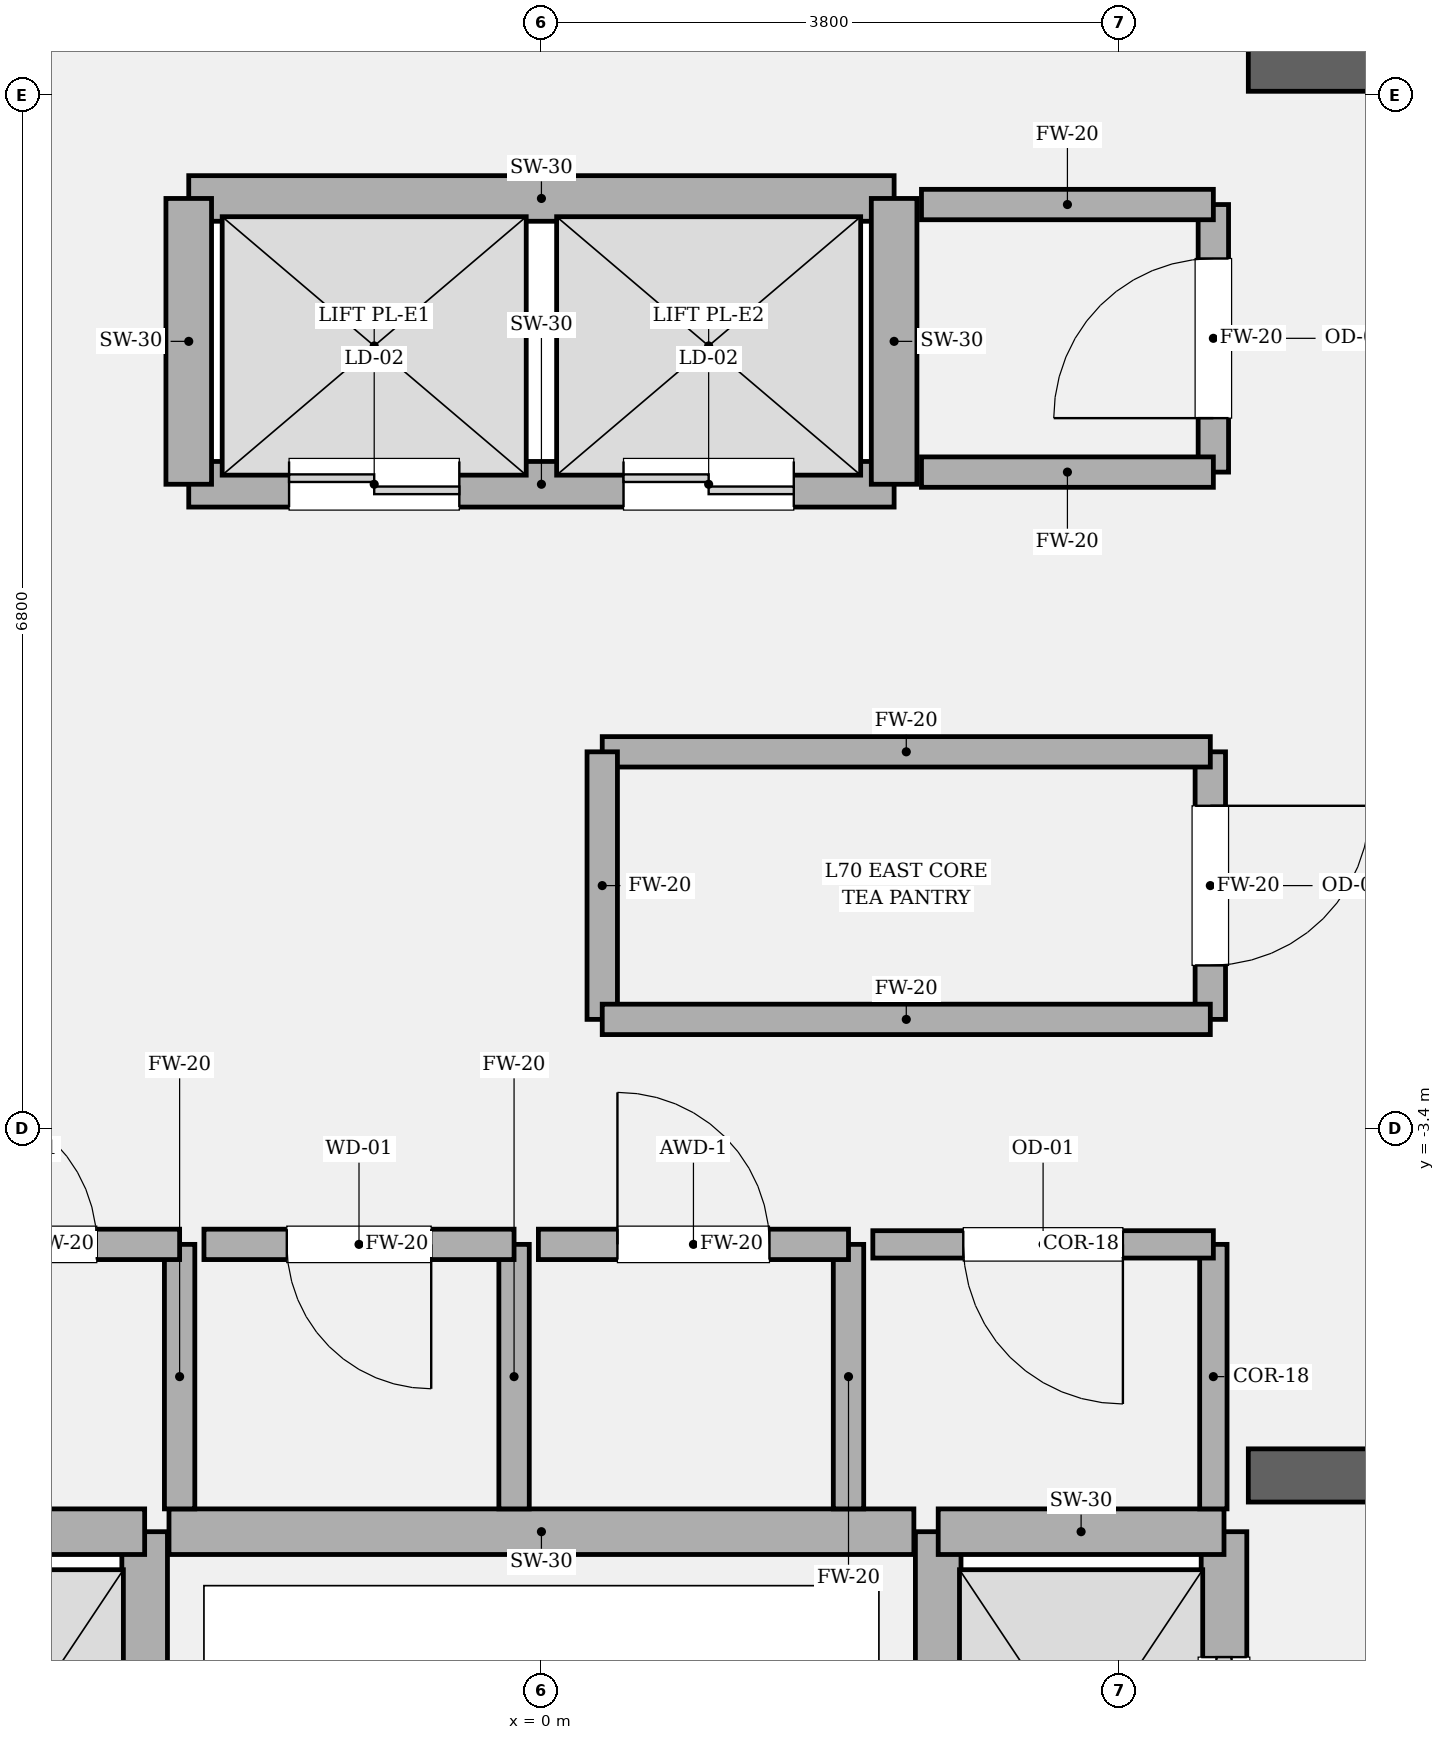
"""IFC4 building model, lengths in metres.
Left out: names, types, materials, properties, quantities, classifications, styles, units other than length and angle.
Written with IfcOpenShell. Run it as: python <this file> out.ifc"""

import sys

from ifc_helpers import new_model, si_unit, direction, frame, frame_2d, origin, place, context, subcontext, project, spatial, rectangle, extrude, element, fill, save


model = new_model("IFC4")
c1 = context("Model", 3, precision=1e-05, world=origin(), true_north=direction((0.0, 1.0)))
c2 = subcontext(c1, "Body", "Model", "MODEL_VIEW")
j1 = project(units=[si_unit("LENGTHUNIT", "METRE"), si_unit("PLANEANGLEUNIT", "RADIAN")], contexts=[c1])
p1 = place(None, origin())
s1 = spatial("IfcSite", under=j1, at=p1, CompositionType="ELEMENT")
p2 = place(p1, origin())
s2 = spatial("IfcBuilding", under=s1, at=p2, CompositionType="ELEMENT")
p3 = place(p2, frame((0.0, 0.0, 296.4)))
s3 = spatial("IfcBuildingStorey", under=s2, at=p3, CompositionType="ELEMENT", Elevation=296.4)
p4 = place(p3, frame((4.65, -5.68, 0.0), z_axis=(0.0, 0.0, 1.0), x_axis=(1.0, 0.0, 0.0)))
e1 = element("IfcWall", 1, at=p4, inside=s3, PredefinedType="SOLIDWALL", context=c2, shape_type="SweptSolid", body=[
    extrude(rectangle(XDim=5.275, YDim=0.35, at=frame_2d((2.638, 0.0))), origin(), (0.0, 0.0, 1.0), 4.2),
])
p5 = place(p4, frame((2.71, 0.0, 0.0)))
e2 = element("IfcOpeningElement", 2, at=p5, cuts=e1, PredefinedType="OPENING", context=c2, shape_type="SweptSolid", body=[
    extrude(rectangle(XDim=1.18, YDim=2.2, at=frame_2d((0.59, 1.1))), frame((0.0, 0.185, 0.0), z_axis=(0.0, -1.0, 0.0), x_axis=(1.0, 0.0, 0.0)), (0.0, 0.0, 1.0), 0.37),
])
p6 = place(p3, frame((4.65, 3.6, 0.0), z_axis=(0.0, 0.0, 1.0), x_axis=(1.0, 0.0, 0.0)))
e3 = element("IfcWall", 3, at=p6, inside=s3, PredefinedType="SOLIDWALL", context=c2, shape_type="SweptSolid", body=[
    extrude(rectangle(XDim=5.275, YDim=0.35, at=frame_2d((2.638, 0.0))), origin(), (0.0, 0.0, 1.0), 4.2),
])
p7 = place(p3, frame((-2.61, -8.82, 0.0), z_axis=(0.0, 0.0, 1.0), x_axis=(0.0, 1.0, 0.0)))
e4 = element("IfcWall", 4, at=p7, inside=s3, PredefinedType="SOLIDWALL", context=c2, shape_type="SweptSolid", body=[
    extrude(rectangle(XDim=2.77, YDim=0.3, at=frame_2d((1.385, 0.0))), origin(), (0.0, 0.0, 1.0), 4.0),
])
p8 = place(p3, frame((-4.49, -6.05, 0.0), z_axis=(0.0, 0.0, 1.0), x_axis=(1.0, 0.0, 0.0)))
e5 = element("IfcWall", 5, at=p8, inside=s3, PredefinedType="SOLIDWALL", context=c2, shape_type="SweptSolid", body=[
    extrude(rectangle(XDim=1.88, YDim=0.3, at=frame_2d((0.94, 0.0))), origin(), (0.0, 0.0, 1.0), 4.0),
])
p9 = place(p3, frame((4.49, -8.82, 0.0), z_axis=(0.0, 0.0, 1.0), x_axis=(0.0, 1.0, 0.0)))
e6 = element("IfcWall", 6, at=p9, inside=s3, PredefinedType="SOLIDWALL", context=c2, shape_type="SweptSolid", body=[
    extrude(rectangle(XDim=2.77, YDim=0.3, at=frame_2d((1.385, 0.0))), origin(), (0.0, 0.0, 1.0), 4.0),
])
p10 = place(p9, frame((0.825, 0.0, 0.0)))
e7 = element("IfcOpeningElement", 7, at=p10, cuts=e6, PredefinedType="OPENING", context=c2, shape_type="SweptSolid", body=[
    extrude(rectangle(XDim=1.12, YDim=2.25, at=frame_2d((0.56, 1.125))), frame((0.0, 0.16, 0.0), z_axis=(0.0, -1.0, 0.0), x_axis=(1.0, 0.0, 0.0)), (0.0, 0.0, 1.0), 0.32),
])
p11 = place(p3, frame((2.61, -8.82, 0.0), z_axis=(0.0, 0.0, 1.0), x_axis=(0.0, 1.0, 0.0)))
e8 = element("IfcWall", 8, at=p11, inside=s3, PredefinedType="SOLIDWALL", context=c2, shape_type="SweptSolid", body=[
    extrude(rectangle(XDim=2.77, YDim=0.3, at=frame_2d((1.385, 0.0))), origin(), (0.0, 0.0, 1.0), 4.0),
])
p12 = place(p3, frame((2.61, -6.05, 0.0), z_axis=(0.0, 0.0, 1.0), x_axis=(1.0, 0.0, 0.0)))
e9 = element("IfcWall", 9, at=p12, inside=s3, PredefinedType="SOLIDWALL", context=c2, shape_type="SweptSolid", body=[
    extrude(rectangle(XDim=1.88, YDim=0.3, at=frame_2d((0.94, 0.0))), origin(), (0.0, 0.0, 1.0), 4.0),
])
p13 = place(p3, frame((-2.32, 0.84, 0.0), z_axis=(0.0, 0.0, 1.0), x_axis=(1.0, 0.0, 0.0)))
e10 = element("IfcWall", 10, at=p13, inside=s3, PredefinedType="SOLIDWALL", context=c2, shape_type="SweptSolid", body=[
    extrude(rectangle(XDim=4.64, YDim=0.3, at=frame_2d((2.32, 0.0))), origin(), (0.0, 0.0, 1.0), 4.0),
])
p14 = place(p13, frame((0.66, 0.0, 0.0)))
e11 = element("IfcOpeningElement", 11, at=p14, cuts=e10, PredefinedType="OPENING", context=c2, shape_type="SweptSolid", body=[
    extrude(rectangle(XDim=1.12, YDim=2.25, at=frame_2d((0.56, 1.125))), frame((0.0, 0.16, 0.0), z_axis=(0.0, -1.0, 0.0), x_axis=(1.0, 0.0, 0.0)), (0.0, 0.0, 1.0), 0.32),
])
p15 = place(p13, frame((2.86, 0.0, 0.0)))
e12 = element("IfcOpeningElement", 12, at=p15, cuts=e10, PredefinedType="OPENING", context=c2, shape_type="SweptSolid", body=[
    extrude(rectangle(XDim=1.12, YDim=2.25, at=frame_2d((0.56, 1.125))), frame((0.0, 0.16, 0.0), z_axis=(0.0, -1.0, 0.0), x_axis=(1.0, 0.0, 0.0)), (0.0, 0.0, 1.0), 0.32),
])
p16 = place(p3, frame((-2.32, 2.72, 0.0), z_axis=(0.0, 0.0, 1.0), x_axis=(1.0, 0.0, 0.0)))
e13 = element("IfcWall", 13, at=p16, inside=s3, PredefinedType="SOLIDWALL", context=c2, shape_type="SweptSolid", body=[
    extrude(rectangle(XDim=4.64, YDim=0.3, at=frame_2d((2.32, 0.0))), origin(), (0.0, 0.0, 1.0), 4.0),
])
for number, where, z_axis, x_axis in (
    (14, (-2.32, 0.84, 0.0), (0.0, 0.0, 1.0), (0.0, 1.0, 0.0)),
    (15, (2.32, 0.84, 0.0), (0.0, 0.0, 1.0), (0.0, 1.0, 0.0)),
):
    element("IfcWall", number, at=place(p3, frame(where, z_axis=z_axis, x_axis=x_axis)), inside=s3, PredefinedType="SOLIDWALL", context=c2, shape_type="SweptSolid", body=[
        extrude(rectangle(XDim=1.88, YDim=0.3, at=frame_2d((0.94, 0.0))), origin(), (0.0, 0.0, 1.0), 4.0),
    ])
p17 = place(p3, frame((-2.45, -6.05, 0.0), z_axis=(0.0, 0.0, 1.0), x_axis=(1.0, 0.0, 0.0)))
e16 = element("IfcWall", 16, at=p17, inside=s3, PredefinedType="SOLIDWALL", context=c2, shape_type="SweptSolid", body=[
    extrude(rectangle(XDim=4.9, YDim=0.3, at=frame_2d((2.45, 0.0))), origin(), (0.0, 0.0, 1.0), 4.0),
])
p18 = place(p3, frame((-2.38, -5.9, 0.0), z_axis=(0.0, 0.0, 1.0), x_axis=(0.0, 1.0, 0.0)))
e17 = element("IfcWall", 17, at=p18, inside=s3, PredefinedType="SOLIDWALL", context=c2, shape_type="SweptSolid", body=[
    extrude(rectangle(XDim=1.74, YDim=0.2, at=frame_2d((0.87, 0.0))), origin(), (0.0, 0.0, 1.0), 4.0),
])
p19 = place(p3, frame((-2.38, -4.16, 0.0), z_axis=(0.0, 0.0, 1.0), x_axis=(-1.0, 0.0, 0.0)))
e18 = element("IfcWall", 18, at=p19, inside=s3, PredefinedType="SOLIDWALL", context=c2, shape_type="SweptSolid", body=[
    extrude(rectangle(XDim=2.04, YDim=0.2, at=frame_2d((1.02, 0.0))), origin(), (0.0, 0.0, 1.0), 4.0),
])
p20 = place(p19, frame((0.545, 0.0, 0.0)))
e19 = element("IfcOpeningElement", 19, at=p20, cuts=e18, PredefinedType="OPENING", context=c2, shape_type="SweptSolid", body=[
    extrude(rectangle(XDim=0.95, YDim=2.15, at=frame_2d((0.475, 1.075))), frame((0.0, 0.11, 0.0), z_axis=(0.0, -1.0, 0.0), x_axis=(1.0, 0.0, 0.0)), (0.0, 0.0, 1.0), 0.22),
])
p21 = place(p3, frame((-0.18, -5.9, 0.0), z_axis=(0.0, 0.0, 1.0), x_axis=(0.0, 1.0, 0.0)))
e20 = element("IfcWall", 20, at=p21, inside=s3, PredefinedType="SOLIDWALL", context=c2, shape_type="SweptSolid", body=[
    extrude(rectangle(XDim=1.74, YDim=0.2, at=frame_2d((0.87, 0.0))), origin(), (0.0, 0.0, 1.0), 4.0),
])
p22 = place(p3, frame((-0.18, -4.16, 0.0), z_axis=(0.0, 0.0, 1.0), x_axis=(-1.0, 0.0, 0.0)))
e21 = element("IfcWall", 21, at=p22, inside=s3, PredefinedType="SOLIDWALL", context=c2, shape_type="SweptSolid", body=[
    extrude(rectangle(XDim=2.04, YDim=0.2, at=frame_2d((1.02, 0.0))), origin(), (0.0, 0.0, 1.0), 4.0),
])
p23 = place(p22, frame((0.545, 0.0, 0.0)))
e22 = element("IfcOpeningElement", 22, at=p23, cuts=e21, PredefinedType="OPENING", context=c2, shape_type="SweptSolid", body=[
    extrude(rectangle(XDim=0.95, YDim=2.15, at=frame_2d((0.475, 1.075))), frame((0.0, 0.11, 0.0), z_axis=(0.0, -1.0, 0.0), x_axis=(1.0, 0.0, 0.0)), (0.0, 0.0, 1.0), 0.22),
])
p24 = place(p3, frame((2.02, -5.9, 0.0), z_axis=(0.0, 0.0, 1.0), x_axis=(0.0, 1.0, 0.0)))
e23 = element("IfcWall", 23, at=p24, inside=s3, PredefinedType="SOLIDWALL", context=c2, shape_type="SweptSolid", body=[
    extrude(rectangle(XDim=1.74, YDim=0.2, at=frame_2d((0.87, 0.0))), origin(), (0.0, 0.0, 1.0), 4.0),
])
p25 = place(p3, frame((2.02, -4.16, 0.0), z_axis=(0.0, 0.0, 1.0), x_axis=(-1.0, 0.0, 0.0)))
e24 = element("IfcWall", 24, at=p25, inside=s3, PredefinedType="SOLIDWALL", context=c2, shape_type="SweptSolid", body=[
    extrude(rectangle(XDim=2.04, YDim=0.2, at=frame_2d((1.02, 0.0))), origin(), (0.0, 0.0, 1.0), 4.0),
])
p26 = place(p25, frame((0.52, 0.0, 0.0)))
e25 = element("IfcOpeningElement", 25, at=p26, cuts=e24, PredefinedType="OPENING", context=c2, shape_type="SweptSolid", body=[
    extrude(rectangle(XDim=1.0, YDim=2.15, at=frame_2d((0.5, 1.075))), frame((0.0, 0.11, 0.0), z_axis=(0.0, -1.0, 0.0), x_axis=(1.0, 0.0, 0.0)), (0.0, 0.0, 1.0), 0.22),
])
p27 = place(p3, frame((4.42, -5.9, 0.0), z_axis=(0.0, 0.0, 1.0), x_axis=(0.0, 1.0, 0.0)))
e26 = element("IfcWall", 26, at=p27, inside=s3, PredefinedType="PARTITIONING", context=c2, shape_type="SweptSolid", body=[
    extrude(rectangle(XDim=1.74, YDim=0.18, at=frame_2d((0.87, 0.0))), origin(), (0.0, 0.0, 1.0), 4.0),
])
p28 = place(p3, frame((4.42, -4.16, 0.0), z_axis=(0.0, 0.0, 1.0), x_axis=(-1.0, 0.0, 0.0)))
e27 = element("IfcWall", 27, at=p28, inside=s3, PredefinedType="PARTITIONING", context=c2, shape_type="SweptSolid", body=[
    extrude(rectangle(XDim=2.24, YDim=0.18, at=frame_2d((1.12, 0.0))), origin(), (0.0, 0.0, 1.0), 4.0),
])
p29 = place(p28, frame((0.595, 0.0, 0.0)))
e28 = element("IfcOpeningElement", 28, at=p29, cuts=e27, PredefinedType="OPENING", context=c2, shape_type="SweptSolid", body=[
    extrude(rectangle(XDim=1.05, YDim=2.2, at=frame_2d((0.525, 1.1))), frame((0.0, 0.1, 0.0), z_axis=(0.0, -1.0, 0.0), x_axis=(1.0, 0.0, 0.0)), (0.0, 0.0, 1.0), 0.2),
])
p30 = place(p3, frame((4.4, -2.68, 0.0), z_axis=(0.0, 0.0, 1.0), x_axis=(0.0, 1.0, 0.0)))
e29 = element("IfcWall", 29, at=p30, inside=s3, PredefinedType="SOLIDWALL", context=c2, shape_type="SweptSolid", body=[
    extrude(rectangle(XDim=1.76, YDim=0.2, at=frame_2d((0.88, 0.0))), origin(), (0.0, 0.0, 1.0), 4.0),
])
p31 = place(p30, frame((0.355, 0.0, 0.0)))
e30 = element("IfcOpeningElement", 30, at=p31, cuts=e29, PredefinedType="OPENING", context=c2, shape_type="SweptSolid", body=[
    extrude(rectangle(XDim=1.05, YDim=2.2, at=frame_2d((0.525, 1.1))), frame((0.0, 0.11, 0.0), z_axis=(0.0, -1.0, 0.0), x_axis=(1.0, 0.0, 0.0)), (0.0, 0.0, 1.0), 0.22),
])
p32 = place(p3, frame((4.4, -0.92, 0.0), z_axis=(0.0, 0.0, 1.0), x_axis=(-1.0, 0.0, 0.0)))
e31 = element("IfcWall", 31, at=p32, inside=s3, PredefinedType="SOLIDWALL", context=c2, shape_type="SweptSolid", body=[
    extrude(rectangle(XDim=4.0, YDim=0.2, at=frame_2d((2.0, 0.0))), origin(), (0.0, 0.0, 1.0), 4.0),
])
p33 = place(p3, frame((0.4, -0.92, 0.0), z_axis=(0.0, 0.0, 1.0), x_axis=(0.0, -1.0, 0.0)))
e32 = element("IfcWall", 32, at=p33, inside=s3, PredefinedType="SOLIDWALL", context=c2, shape_type="SweptSolid", body=[
    extrude(rectangle(XDim=1.76, YDim=0.2, at=frame_2d((0.88, 0.0))), origin(), (0.0, 0.0, 1.0), 4.0),
])
p34 = place(p3, frame((0.4, -2.68, 0.0), z_axis=(0.0, 0.0, 1.0), x_axis=(1.0, 0.0, 0.0)))
e33 = element("IfcWall", 33, at=p34, inside=s3, PredefinedType="SOLIDWALL", context=c2, shape_type="SweptSolid", body=[
    extrude(rectangle(XDim=4.0, YDim=0.2, at=frame_2d((2.0, 0.0))), origin(), (0.0, 0.0, 1.0), 4.0),
])
p35 = place(p3, frame((4.42, 0.92, 0.0), z_axis=(0.0, 0.0, 1.0), x_axis=(0.0, 1.0, 0.0)))
e34 = element("IfcWall", 34, at=p35, inside=s3, PredefinedType="SOLIDWALL", context=c2, shape_type="SweptSolid", body=[
    extrude(rectangle(XDim=1.76, YDim=0.2, at=frame_2d((0.88, 0.0))), origin(), (0.0, 0.0, 1.0), 4.0),
])
p36 = place(p35, frame((0.355, 0.0, 0.0)))
e35 = element("IfcOpeningElement", 35, at=p36, cuts=e34, PredefinedType="OPENING", context=c2, shape_type="SweptSolid", body=[
    extrude(rectangle(XDim=1.05, YDim=2.2, at=frame_2d((0.525, 1.1))), frame((0.0, 0.11, 0.0), z_axis=(0.0, -1.0, 0.0), x_axis=(1.0, 0.0, 0.0)), (0.0, 0.0, 1.0), 0.22),
])
for number, where, z_axis, x_axis in (
    (36, (4.42, 2.68, 0.0), (0.0, 0.0, 1.0), (-1.0, 0.0, 0.0)),
    (37, (2.5, 0.92, 0.0), (0.0, 0.0, 1.0), (1.0, 0.0, 0.0)),
):
    element("IfcWall", number, at=place(p3, frame(where, z_axis=z_axis, x_axis=x_axis)), inside=s3, PredefinedType="SOLIDWALL", context=c2, shape_type="SweptSolid", body=[
        extrude(rectangle(XDim=1.92, YDim=0.2, at=frame_2d((0.96, 0.0))), origin(), (0.0, 0.0, 1.0), 4.0),
    ])
p37 = place(p10, origin())
e38 = element("IfcDoor", 38, at=p37, inside=s3, OperationType="SLIDING_TO_RIGHT", PredefinedType="DOOR", context=c2, shape_type="SweptSolid", body=[
    extrude(rectangle(XDim=1.12, YDim=2.25, at=frame_2d((0.56, 1.125))), frame((0.0, 0.025, 0.0), z_axis=(0.0, -1.0, 0.0), x_axis=(1.0, 0.0, 0.0)), (0.0, 0.0, 1.0), 0.05),
])
fill(e7, e38)
p38 = place(p14, origin())
e39 = element("IfcDoor", 39, at=p38, inside=s3, OperationType="DOUBLE_DOOR_SLIDING", PredefinedType="DOOR", context=c2, shape_type="SweptSolid", body=[
    extrude(rectangle(XDim=1.12, YDim=2.25, at=frame_2d((0.56, 1.125))), frame((0.0, 0.025, 0.0), z_axis=(0.0, -1.0, 0.0), x_axis=(1.0, 0.0, 0.0)), (0.0, 0.0, 1.0), 0.05),
])
fill(e11, e39)
p39 = place(p15, origin())
e40 = element("IfcDoor", 40, at=p39, inside=s3, OperationType="DOUBLE_DOOR_SLIDING", PredefinedType="DOOR", context=c2, shape_type="SweptSolid", body=[
    extrude(rectangle(XDim=1.12, YDim=2.25, at=frame_2d((0.56, 1.125))), frame((0.0, 0.025, 0.0), z_axis=(0.0, -1.0, 0.0), x_axis=(1.0, 0.0, 0.0)), (0.0, 0.0, 1.0), 0.05),
])
fill(e12, e40)
p40 = place(p20, origin())
e41 = element("IfcDoor", 41, at=p40, inside=s3, OperationType="SINGLE_SWING_RIGHT", PredefinedType="DOOR", context=c2, shape_type="SweptSolid", body=[
    extrude(rectangle(XDim=0.95, YDim=2.15, at=frame_2d((0.475, 1.075))), frame((0.0, 0.025, 0.0), z_axis=(0.0, -1.0, 0.0), x_axis=(1.0, 0.0, 0.0)), (0.0, 0.0, 1.0), 0.05),
])
fill(e19, e41)
p41 = place(p23, origin())
e42 = element("IfcDoor", 42, at=p41, inside=s3, OperationType="SINGLE_SWING_LEFT", PredefinedType="DOOR", context=c2, shape_type="SweptSolid", body=[
    extrude(rectangle(XDim=0.95, YDim=2.15, at=frame_2d((0.475, 1.075))), frame((0.0, 0.025, 0.0), z_axis=(0.0, -1.0, 0.0), x_axis=(1.0, 0.0, 0.0)), (0.0, 0.0, 1.0), 0.05),
])
fill(e22, e42)
p42 = place(p26, origin())
e43 = element("IfcDoor", 43, at=p42, inside=s3, OperationType="SINGLE_SWING_RIGHT", PredefinedType="DOOR", context=c2, shape_type="SweptSolid", body=[
    extrude(rectangle(XDim=1.0, YDim=2.15, at=frame_2d((0.5, 1.075))), frame((0.0, 0.025, 0.0), z_axis=(0.0, -1.0, 0.0), x_axis=(1.0, 0.0, 0.0)), (0.0, 0.0, 1.0), 0.05),
])
fill(e25, e43)
p43 = place(p29, origin())
e44 = element("IfcDoor", 44, at=p43, inside=s3, OperationType="SINGLE_SWING_LEFT", PredefinedType="DOOR", context=c2, shape_type="SweptSolid", body=[
    extrude(rectangle(XDim=1.05, YDim=2.2, at=frame_2d((0.525, 1.1))), frame((0.0, 0.025, 0.0), z_axis=(0.0, -1.0, 0.0), x_axis=(1.0, 0.0, 0.0)), (0.0, 0.0, 1.0), 0.05),
])
fill(e28, e44)
p44 = place(p31, origin())
e45 = element("IfcDoor", 45, at=p44, inside=s3, OperationType="SINGLE_SWING_RIGHT", PredefinedType="DOOR", context=c2, shape_type="SweptSolid", body=[
    extrude(rectangle(XDim=1.05, YDim=2.2, at=frame_2d((0.525, 1.1))), frame((0.0, 0.025, 0.0), z_axis=(0.0, -1.0, 0.0), x_axis=(1.0, 0.0, 0.0)), (0.0, 0.0, 1.0), 0.05),
])
fill(e30, e45)
p45 = place(p36, origin())
e46 = element("IfcDoor", 46, at=p45, inside=s3, OperationType="SINGLE_SWING_LEFT", PredefinedType="DOOR", context=c2, shape_type="SweptSolid", body=[
    extrude(rectangle(XDim=1.05, YDim=2.2, at=frame_2d((0.525, 1.1))), frame((0.0, 0.025, 0.0), z_axis=(0.0, -1.0, 0.0), x_axis=(1.0, 0.0, 0.0)), (0.0, 0.0, 1.0), 0.05),
])
fill(e35, e46)
save(model, sys.argv[1])
